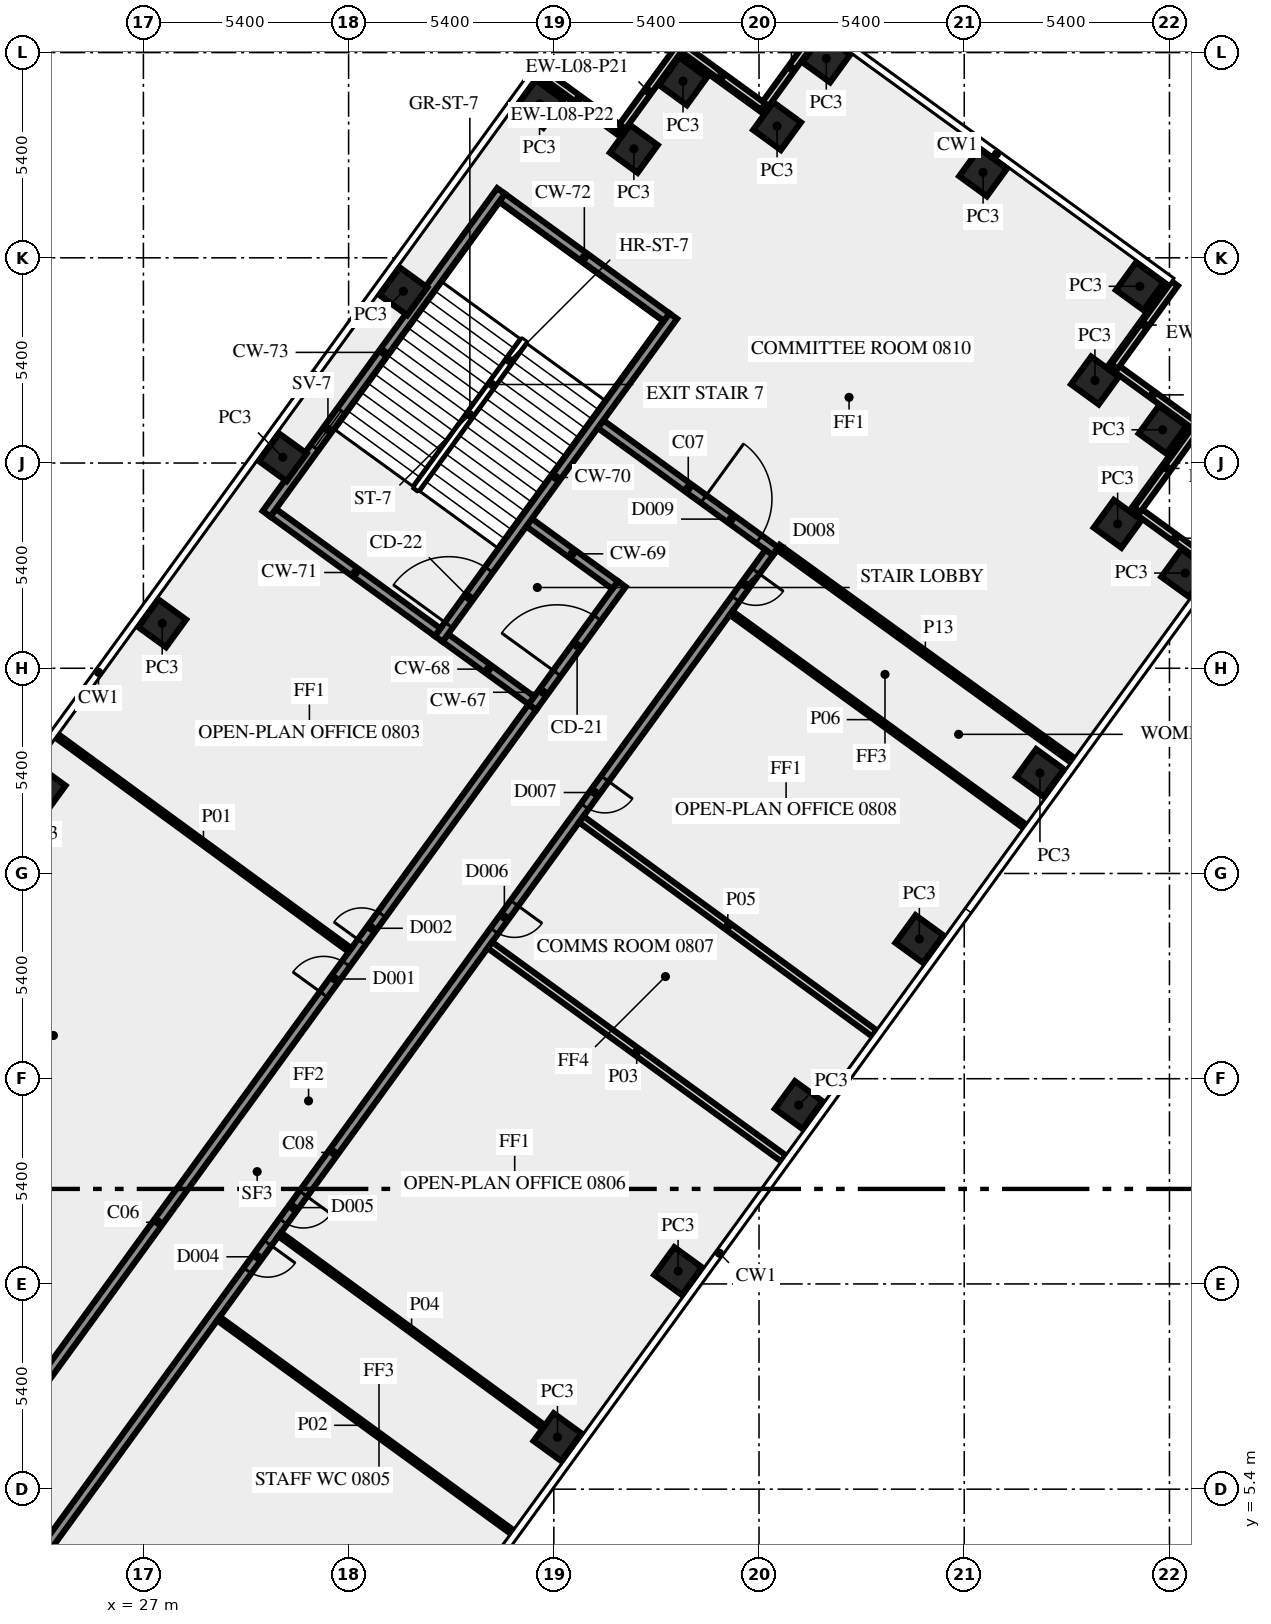
"""IFC4 building model, lengths in metres.
Left out: names, types, materials, properties, quantities, classifications, styles, units other than length and angle.
Written with IfcOpenShell. Run it as: python <this file> out.ifc"""

import sys

from ifc_helpers import new_model, si_unit, direction, frame, frame_2d, origin, origin_2d, place, context, subcontext, project, spatial, rectangle, extrude, element, fill, save


model = new_model("IFC4")
c1 = context("Model", 3, precision=1e-05, world=origin(), true_north=direction((0.0, 1.0)))
c2 = subcontext(c1, "Body", "Model", "MODEL_VIEW")
j1 = project(units=[si_unit("LENGTHUNIT", "METRE"), si_unit("PLANEANGLEUNIT", "RADIAN")], contexts=[c1])
p1 = place(None, origin())
s1 = spatial("IfcSite", under=j1, at=p1, CompositionType="ELEMENT")
p2 = place(p1, origin())
s2 = spatial("IfcBuilding", under=s1, at=p2, CompositionType="ELEMENT")
p3 = place(p2, frame((0.0, 0.0, 39.0)))
s3 = spatial("IfcBuildingStorey", under=s2, at=p3, CompositionType="ELEMENT", Elevation=39.0)
for number, where, z_axis, x_axis in (
    (1, (37.896, 6.769, 0.0), (0.0, 0.0, 1.0), (0.588, 0.809, 0.0)),
    (2, (41.07, 11.137, 0.0), (0.0, 0.0, 1.0), (0.588, 0.809, 0.0)),
    (3, (44.244, 15.506, 0.0), (0.0, 0.0, 1.0), (0.588, 0.809, 0.0)),
    (4, (47.418, 19.875, 0.0), (0.0, 0.0, 1.0), (0.588, 0.809, 0.0)),
    (5, (50.592, 24.243, 0.0), (0.0, 0.0, 1.0), (0.588, 0.809, 0.0)),
    (6, (54.415, 29.505, 0.0), (0.0, 0.0, 1.0), (0.588, 0.809, 0.0)),
    (7, (52.636, 30.8, 0.0), (0.0, 0.0, 1.0), (-0.809, 0.588, 0.0)),
    (8, (53.82, 33.275, 0.0), (0.0, 0.0, 1.0), (-0.809, 0.588, 0.0)),
    (9, (52.039, 34.571, 0.0), (0.0, 0.0, 1.0), (0.588, 0.809, 0.0)),
    (10, (53.22, 37.05, 0.0), (0.0, 0.0, 1.0), (-0.809, 0.588, 0.0)),
    (11, (49.096, 40.047, 0.0), (0.0, 0.0, 1.0), (-0.809, 0.588, 0.0)),
    (12, (44.97, 43.045, 0.0), (0.0, 0.0, 1.0), (-0.809, 0.588, 0.0)),
    (13, (43.675, 41.265, 0.0), (0.0, 0.0, 1.0), (-0.809, 0.588, 0.0)),
    (14, (41.2, 42.445, 0.0), (0.0, 0.0, 1.0), (-0.588, -0.809, 0.0)),
    (15, (39.906, 40.666, 0.0), (0.0, 0.0, 1.0), (-0.588, -0.809, 0.0)),
    (16, (37.425, 41.85, 0.0), (0.0, 0.0, 1.0), (-0.588, -0.809, 0.0)),
    (17, (33.843, 36.919, 0.0), (0.0, 0.0, 1.0), (-0.588, -0.809, 0.0)),
    (18, (30.669, 32.55, 0.0), (0.0, 0.0, 1.0), (-0.588, -0.809, 0.0)),
    (19, (27.495, 28.181, 0.0), (0.0, 0.0, 1.0), (-0.588, -0.809, 0.0)),
    (20, (24.321, 23.812, 0.0), (0.0, 0.0, 1.0), (-0.588, -0.809, 0.0)),
):
    element("IfcColumn", number, at=place(p3, frame(where, z_axis=z_axis, x_axis=x_axis)), inside=s3, PredefinedType="COLUMN", context=c2, shape_type="SweptSolid", body=[
        extrude(rectangle(XDim=0.9, YDim=0.9, at=origin_2d()), origin(), (0.0, 0.0, 1.0), 3.65),
    ])
p4 = place(p3, frame((55.247, 29.629, 0.0), z_axis=(0.0, 0.0, 1.0), x_axis=(-0.809033161865, 0.587762999008, 0.0)))
e21 = element("IfcWall", 21, at=p4, inside=s3, PredefinedType="SOLIDWALL", context=c2, shape_type="SweptSolid", body=[
    extrude(rectangle(XDim=2.7, YDim=0.2, at=frame_2d((1.35, 0.0))), origin(), (0.0, 0.0, 1.0), 3.65),
])
p5 = place(p3, frame((53.151, 31.167, 0.0), z_axis=(0.0, 0.0, 1.0), x_axis=(0.587779184282, 0.809021403008, 0.0)))
e22 = element("IfcWall", 22, at=p5, inside=s3, PredefinedType="SOLIDWALL", context=c2, shape_type="SweptSolid", body=[
    extrude(rectangle(XDim=2.7, YDim=0.2, at=frame_2d((1.35, 0.0))), origin(), (0.0, 0.0, 1.0), 3.65),
])
for number, where, z_axis, x_axis in (
    (23, (54.65, 33.4, 0.0), (0.0, 0.0, 1.0), (-0.809, 0.588, 0.0)),
    (24, (52.553, 34.938, 0.0), (0.0, 0.0, 1.0), (0.588, 0.809, 0.0)),
    (25, (44.846, 43.875, 0.0), (0.0, 0.0, 1.0), (-0.588, -0.809, 0.0)),
    (26, (43.308, 41.779, 0.0), (0.0, 0.0, 1.0), (-0.809, 0.588, 0.0)),
):
    element("IfcWall", number, at=place(p3, frame(where, z_axis=z_axis, x_axis=x_axis)), inside=s3, PredefinedType="SOLIDWALL", context=c2, shape_type="SweptSolid", body=[
        extrude(rectangle(XDim=2.7, YDim=0.2, at=frame_2d((1.35, 0.0))), origin(), (0.0, 0.0, 1.0), 3.65),
    ])
p6 = place(p3, frame((41.075, 43.278, 0.0), z_axis=(0.0, 0.0, 1.0), x_axis=(-0.587806000234, -0.809001919707, 0.0)))
e27 = element("IfcWall", 27, at=p6, inside=s3, PredefinedType="SOLIDWALL", context=c2, shape_type="SweptSolid", body=[
    extrude(rectangle(XDim=2.7, YDim=0.2, at=frame_2d((1.35, 0.0))), origin(), (0.0, 0.0, 1.0), 3.65),
])
p7 = place(p3, frame((39.537, 41.181, 0.0), z_axis=(0.0, 0.0, 1.0), x_axis=(-0.809033161865, 0.587762999008, 0.0)))
e28 = element("IfcWall", 28, at=p7, inside=s3, PredefinedType="SOLIDWALL", context=c2, shape_type="SweptSolid", body=[
    extrude(rectangle(XDim=2.7, YDim=0.2, at=frame_2d((1.35, 0.0))), origin(), (0.0, 0.0, 1.0), 3.65),
])
p8 = place(p3, frame((37.238, 25.98, 0.0), z_axis=(0.0, 0.0, 1.0), x_axis=(0.587772420479, 0.809026317077, 0.0)))
e29 = element("IfcWall", 29, at=p8, inside=s3, PredefinedType="SHEAR", context=c2, shape_type="SweptSolid", body=[
    extrude(rectangle(XDim=4.0, YDim=0.25, at=frame_2d((2.0, 0.0))), origin(), (0.0, 0.0, 1.0), 3.65),
])
p9 = place(p8, frame((1.1, 0.0, 0.0)))
e30 = element("IfcOpeningElement", 30, at=p9, cuts=e29, PredefinedType="OPENING", context=c2, shape_type="SweptSolid", body=[
    extrude(rectangle(XDim=1.8, YDim=2.1, at=frame_2d((0.9, 1.05))), frame((0.0, 0.135, 0.0), z_axis=(0.0, -1.0, 0.0), x_axis=(1.0, 0.0, 0.0)), (0.0, 0.0, 1.0), 0.27),
])
for number, where, z_axis, x_axis in (
    (31, (37.21, 26.154, 0.0), (0.0, 0.0, 1.0), (-0.809, 0.588, 0.0)),
    (32, (39.414, 29.188, 0.0), (0.0, 0.0, 1.0), (-0.809, 0.588, 0.0)),
):
    element("IfcWall", number, at=place(p3, frame(where, z_axis=z_axis, x_axis=x_axis)), inside=s3, PredefinedType="SHEAR", context=c2, shape_type="SweptSolid", body=[
        extrude(rectangle(XDim=2.8, YDim=0.25, at=frame_2d((1.4, 0.0))), origin(), (0.0, 0.0, 1.0), 3.65),
    ])
p10 = place(p3, frame((34.77, 27.772, 0.0), z_axis=(0.0, 0.0, 1.0), x_axis=(0.587795589702, 0.809009483706, 0.0)))
e33 = element("IfcWall", 33, at=p10, inside=s3, PredefinedType="SHEAR", context=c2, shape_type="SweptSolid", body=[
    extrude(rectangle(XDim=10.5, YDim=0.25, at=frame_2d((5.25, 0.0))), origin(), (0.0, 0.0, 1.0), 3.65),
])
p11 = place(p10, frame((0.45, 0.0, 0.0)))
e34 = element("IfcOpeningElement", 34, at=p11, cuts=e33, PredefinedType="OPENING", context=c2, shape_type="SweptSolid", body=[
    extrude(rectangle(XDim=1.8, YDim=2.1, at=frame_2d((0.9, 1.05))), frame((0.0, 0.135, 0.0), z_axis=(0.0, -1.0, 0.0), x_axis=(1.0, 0.0, 0.0)), (0.0, 0.0, 1.0), 0.27),
])
p12 = place(p3, frame((34.742, 27.947, 0.0), z_axis=(0.0, 0.0, 1.0), x_axis=(-0.8089984606, 0.587810760999, 0.0)))
e35 = element("IfcWall", 35, at=p12, inside=s3, PredefinedType="SHEAR", context=c2, shape_type="SweptSolid", body=[
    extrude(rectangle(XDim=5.35, YDim=0.25, at=frame_2d((2.675, 0.0))), origin(), (0.0, 0.0, 1.0), 3.65),
])
p13 = place(p3, frame((40.767, 36.24, 0.0), z_axis=(0.0, 0.0, 1.0), x_axis=(-0.809020161303, 0.587780893365, 0.0)))
e36 = element("IfcWall", 36, at=p13, inside=s3, PredefinedType="SHEAR", context=c2, shape_type="SweptSolid", body=[
    extrude(rectangle(XDim=5.35, YDim=0.25, at=frame_2d((2.675, 0.0))), origin(), (0.0, 0.0, 1.0), 3.65),
])
p14 = place(p3, frame((30.24, 31.064, 0.0), z_axis=(0.0, 0.0, 1.0), x_axis=(0.587795589702, 0.809009483706, 0.0)))
e37 = element("IfcWall", 37, at=p14, inside=s3, PredefinedType="SHEAR", context=c2, shape_type="SweptSolid", body=[
    extrude(rectangle(XDim=10.5, YDim=0.25, at=frame_2d((5.25, 0.0))), origin(), (0.0, 0.0, 1.0), 3.65),
])
p15 = place(p14, frame((2.15, 0.0, 1.0)))
e38 = element("IfcOpeningElement", 38, at=p15, cuts=e37, PredefinedType="OPENING", context=c2, shape_type="SweptSolid", body=[
    extrude(rectangle(XDim=1.2, YDim=1.2, at=frame_2d((0.6, 0.6))), frame((0.0, 0.135, 0.0), z_axis=(0.0, -1.0, 0.0), x_axis=(1.0, 0.0, 0.0)), (0.0, 0.0, 1.0), 0.27),
])
p16 = place(p3, frame((17.545, -1.125, 0.0), z_axis=(0.0, 0.0, 1.0), x_axis=(0.587786323093, 0.809016216391, 0.0)))
e39 = element("IfcWall", 39, at=p16, inside=s3, PredefinedType="SOLIDWALL", context=c2, shape_type="SweptSolid", body=[
    extrude(rectangle(XDim=33.493, YDim=0.25, at=frame_2d((16.747, 0.0))), origin(), (0.0, 0.0, 1.0), 3.65),
])
p17 = place(p16, frame((25.857, 0.0, 0.0)))
e40 = element("IfcOpeningElement", 40, at=p17, cuts=e39, PredefinedType="OPENING", context=c2, shape_type="SweptSolid", body=[
    extrude(rectangle(XDim=0.9, YDim=2.1, at=frame_2d((0.45, 1.05))), frame((0.0, 0.135, 0.0), z_axis=(0.0, -1.0, 0.0), x_axis=(1.0, 0.0, 0.0)), (0.0, 0.0, 1.0), 0.27),
])
p18 = place(p16, frame((24.157, 0.0, 0.0)))
e41 = element("IfcOpeningElement", 41, at=p18, cuts=e39, PredefinedType="OPENING", context=c2, shape_type="SweptSolid", body=[
    extrude(rectangle(XDim=1.0, YDim=2.1, at=frame_2d((0.5, 1.05))), frame((0.0, 0.135, 0.0), z_axis=(0.0, -1.0, 0.0), x_axis=(1.0, 0.0, 0.0)), (0.0, 0.0, 1.0), 0.27),
])
p19 = place(p3, frame((39.034, 33.42, 0.0), z_axis=(0.0, 0.0, 1.0), x_axis=(0.809023325802, -0.587776537732, 0.0)))
e42 = element("IfcWall", 42, at=p19, inside=s3, PredefinedType="SOLIDWALL", context=c2, shape_type="SweptSolid", body=[
    extrude(rectangle(XDim=5.695, YDim=0.25, at=frame_2d((2.848, 0.0))), origin(), (0.0, 0.0, 1.0), 3.65),
])
p20 = place(p19, frame((3.345, 0.0, 0.0)))
e43 = element("IfcOpeningElement", 43, at=p20, cuts=e42, PredefinedType="OPENING", context=c2, shape_type="SweptSolid", body=[
    extrude(rectangle(XDim=1.8, YDim=2.1, at=frame_2d((0.9, 1.05))), frame((0.0, 0.135, 0.0), z_axis=(0.0, -1.0, 0.0), x_axis=(1.0, 0.0, 0.0)), (0.0, 0.0, 1.0), 0.27),
])
p21 = place(p3, frame((43.467, 30.045, 0.0), z_axis=(0.0, 0.0, 1.0), x_axis=(-0.587784726077, -0.809017376692, 0.0)))
e44 = element("IfcWall", 44, at=p21, inside=s3, PredefinedType="SOLIDWALL", context=c2, shape_type="SweptSolid", body=[
    extrude(rectangle(XDim=39.02, YDim=0.25, at=frame_2d((19.51, 0.0))), origin(), (0.0, 0.0, 1.0), 3.65),
])
p22 = place(p21, frame((37.588, 0.0, 0.0)))
e45 = element("IfcOpeningElement", 45, at=p22, cuts=e44, PredefinedType="OPENING", context=c2, shape_type="SweptSolid", body=[
    extrude(rectangle(XDim=0.9, YDim=2.1, at=frame_2d((0.45, 1.05))), frame((0.0, 0.135, 0.0), z_axis=(0.0, -1.0, 0.0), x_axis=(1.0, 0.0, 0.0)), (0.0, 0.0, 1.0), 0.27),
])
p23 = place(p21, frame((20.855, 0.0, 0.0)))
e46 = element("IfcOpeningElement", 46, at=p23, cuts=e44, PredefinedType="OPENING", context=c2, shape_type="SweptSolid", body=[
    extrude(rectangle(XDim=0.9, YDim=2.1, at=frame_2d((0.45, 1.05))), frame((0.0, 0.135, 0.0), z_axis=(0.0, -1.0, 0.0), x_axis=(1.0, 0.0, 0.0)), (0.0, 0.0, 1.0), 0.27),
])
p24 = place(p21, frame((7.355, 0.0, 0.0)))
e47 = element("IfcOpeningElement", 47, at=p24, cuts=e44, PredefinedType="OPENING", context=c2, shape_type="SweptSolid", body=[
    extrude(rectangle(XDim=0.9, YDim=2.1, at=frame_2d((0.45, 1.05))), frame((0.0, 0.135, 0.0), z_axis=(0.0, -1.0, 0.0), x_axis=(1.0, 0.0, 0.0)), (0.0, 0.0, 1.0), 0.27),
])
p25 = place(p21, frame((11.404, 0.0, 0.0)))
e48 = element("IfcOpeningElement", 48, at=p25, cuts=e44, PredefinedType="OPENING", context=c2, shape_type="SweptSolid", body=[
    extrude(rectangle(XDim=0.9, YDim=2.1, at=frame_2d((0.45, 1.05))), frame((0.0, 0.135, 0.0), z_axis=(0.0, -1.0, 0.0), x_axis=(1.0, 0.0, 0.0)), (0.0, 0.0, 1.0), 0.27),
])
p26 = place(p21, frame((0.604, 0.0, 0.0)))
e49 = element("IfcOpeningElement", 49, at=p26, cuts=e44, PredefinedType="OPENING", context=c2, shape_type="SweptSolid", body=[
    extrude(rectangle(XDim=0.9, YDim=2.1, at=frame_2d((0.45, 1.05))), frame((0.0, 0.135, 0.0), z_axis=(0.0, -1.0, 0.0), x_axis=(1.0, 0.0, 0.0)), (0.0, 0.0, 1.0), 0.27),
])
p27 = place(p21, frame((22.455, 0.0, 0.0)))
e50 = element("IfcOpeningElement", 50, at=p27, cuts=e44, PredefinedType="OPENING", context=c2, shape_type="SweptSolid", body=[
    extrude(rectangle(XDim=0.9, YDim=2.1, at=frame_2d((0.45, 1.05))), frame((0.0, 0.135, 0.0), z_axis=(0.0, -1.0, 0.0), x_axis=(1.0, 0.0, 0.0)), (0.0, 0.0, 1.0), 0.27),
])
p28 = place(p3, frame((24.724, 25.217, 0.0), z_axis=(0.0, 0.0, 1.0), x_axis=(0.807606997933, -0.589721067023, 0.0)))
e51 = element("IfcWall", 51, at=p28, inside=s3, PredefinedType="PARTITIONING", context=c2, shape_type="SweptSolid", body=[
    extrude(rectangle(XDim=9.55, YDim=0.12, at=frame_2d((4.775, 0.0))), origin(), (0.0, 0.0, 1.0), 2.75),
])
p29 = place(p3, frame((36.702, 4.274, 0.0), z_axis=(0.0, 0.0, 1.0), x_axis=(-0.808998008689, 0.58781138296, 0.0)))
e52 = element("IfcWall", 52, at=p29, inside=s3, PredefinedType="PARTITIONING", context=c2, shape_type="SweptSolid", body=[
    extrude(rectangle(XDim=9.55, YDim=0.12, at=frame_2d((4.775, 0.0))), origin(), (0.0, 0.0, 1.0), 2.75),
])
p30 = place(p3, frame((43.844, 14.104, 0.0), z_axis=(0.0, 0.0, 1.0), x_axis=(-0.809102944047, 0.587666934526, 0.0)))
e53 = element("IfcWall", 53, at=p30, inside=s3, PredefinedType="SOLIDWALL", context=c2, shape_type="SweptSolid", body=[
    extrude(rectangle(XDim=9.55, YDim=0.2, at=frame_2d((4.775, 0.0))), origin(), (0.0, 0.0, 1.0), 2.75),
])
p31 = place(p3, frame((30.587, 12.104, 0.0), z_axis=(0.0, 0.0, 1.0), x_axis=(0.807590933527, -0.589743066161, 0.0)))
e54 = element("IfcWall", 54, at=p31, inside=s3, PredefinedType="PARTITIONING", context=c2, shape_type="SweptSolid", body=[
    extrude(rectangle(XDim=8.594, YDim=0.12, at=frame_2d((4.297, 0.0))), origin(), (0.0, 0.0, 1.0), 3.65),
])
p32 = place(p3, frame((38.522, 23.026, 0.0), z_axis=(0.0, 0.0, 1.0), x_axis=(0.807606997933, -0.589721067023, 0.0)))
e55 = element("IfcWall", 55, at=p32, inside=s3, PredefinedType="SOLIDWALL", context=c2, shape_type="SweptSolid", body=[
    extrude(rectangle(XDim=9.55, YDim=0.2, at=frame_2d((4.775, 0.0))), origin(), (0.0, 0.0, 1.0), 2.75),
])
p33 = place(p3, frame((50.192, 22.841, 0.0), z_axis=(0.0, 0.0, 1.0), x_axis=(-0.809033337127, 0.587762757767, 0.0)))
e56 = element("IfcWall", 56, at=p33, inside=s3, PredefinedType="PARTITIONING", context=c2, shape_type="SweptSolid", body=[
    extrude(rectangle(XDim=9.551, YDim=0.12, at=frame_2d((4.775, 0.0))), origin(), (0.0, 0.0, 1.0), 2.75),
])
p34 = place(p3, frame((43.698, 30.185, 0.0), z_axis=(0.0, 0.0, 1.0), x_axis=(0.810419489461, -0.58585002441, 0.0)))
e57 = element("IfcWall", 57, at=p34, inside=s3, PredefinedType="PARTITIONING", context=c2, shape_type="SweptSolid", body=[
    extrude(rectangle(XDim=9.57, YDim=0.15, at=frame_2d((4.785, 0.0))), origin(), (0.0, 0.0, 1.0), 2.75),
])
p35 = place(p9, origin())
e58 = element("IfcDoor", 58, at=p35, inside=s3, OperationType="DOUBLE_DOOR_SINGLE_SWING", PredefinedType="DOOR", context=c2, shape_type="SweptSolid", body=[
    extrude(rectangle(XDim=1.8, YDim=2.1, at=frame_2d((0.9, 1.05))), frame((0.0, 0.025, 0.0), z_axis=(0.0, -1.0, 0.0), x_axis=(1.0, 0.0, 0.0)), (0.0, 0.0, 1.0), 0.05),
])
fill(e30, e58)
p36 = place(p11, origin())
e59 = element("IfcDoor", 59, at=p36, inside=s3, OperationType="DOUBLE_DOOR_SINGLE_SWING", PredefinedType="DOOR", context=c2, shape_type="SweptSolid", body=[
    extrude(rectangle(XDim=1.8, YDim=2.1, at=frame_2d((0.9, 1.05))), frame((0.0, 0.025, 0.0), z_axis=(0.0, -1.0, 0.0), x_axis=(1.0, 0.0, 0.0)), (0.0, 0.0, 1.0), 0.05),
])
fill(e34, e59)
p37 = place(p15, origin())
e60 = element("IfcWindow", 60, at=p37, inside=s3, PartitioningType="SINGLE_PANEL", PredefinedType="WINDOW", context=c2, shape_type="SweptSolid", body=[
    extrude(rectangle(XDim=1.2, YDim=1.2, at=frame_2d((0.6, 0.6))), frame((0.0, 0.03, 0.0), z_axis=(0.0, -1.0, 0.0), x_axis=(1.0, 0.0, 0.0)), (0.0, 0.0, 1.0), 0.06),
])
fill(e38, e60)
p38 = place(p17, origin())
e61 = element("IfcDoor", 61, at=p38, inside=s3, OperationType="SINGLE_SWING_LEFT", PredefinedType="DOOR", context=c2, shape_type="SweptSolid", body=[
    extrude(rectangle(XDim=0.9, YDim=2.1, at=frame_2d((0.45, 1.05))), frame((0.0, 0.025, 0.0), z_axis=(0.0, -1.0, 0.0), x_axis=(1.0, 0.0, 0.0)), (0.0, 0.0, 1.0), 0.05),
])
fill(e40, e61)
p39 = place(p23, origin())
e62 = element("IfcDoor", 62, at=p39, inside=s3, OperationType="SINGLE_SWING_RIGHT", PredefinedType="DOOR", context=c2, shape_type="SweptSolid", body=[
    extrude(rectangle(XDim=0.9, YDim=2.1, at=frame_2d((0.45, 1.05))), frame((0.0, 0.025, 0.0), z_axis=(0.0, -1.0, 0.0), x_axis=(1.0, 0.0, 0.0)), (0.0, 0.0, 1.0), 0.05),
])
fill(e46, e62)
p40 = place(p24, origin())
e63 = element("IfcDoor", 63, at=p40, inside=s3, OperationType="SINGLE_SWING_RIGHT", PredefinedType="DOOR", context=c2, shape_type="SweptSolid", body=[
    extrude(rectangle(XDim=0.9, YDim=2.1, at=frame_2d((0.45, 1.05))), frame((0.0, 0.025, 0.0), z_axis=(0.0, -1.0, 0.0), x_axis=(1.0, 0.0, 0.0)), (0.0, 0.0, 1.0), 0.05),
])
fill(e47, e63)
p41 = place(p20, origin())
e64 = element("IfcDoor", 64, at=p41, inside=s3, OperationType="DOUBLE_DOOR_SINGLE_SWING", PredefinedType="DOOR", context=c2, shape_type="SweptSolid", body=[
    extrude(rectangle(XDim=1.8, YDim=2.1, at=frame_2d((0.9, 1.05))), frame((0.0, 0.025, 0.0), z_axis=(0.0, -1.0, 0.0), x_axis=(1.0, 0.0, 0.0)), (0.0, 0.0, 1.0), 0.05),
])
fill(e43, e64)
p42 = place(p25, origin())
e65 = element("IfcDoor", 65, at=p42, inside=s3, OperationType="SINGLE_SWING_RIGHT", PredefinedType="DOOR", context=c2, shape_type="SweptSolid", body=[
    extrude(rectangle(XDim=0.9, YDim=2.1, at=frame_2d((0.45, 1.05))), frame((0.0, 0.025, 0.0), z_axis=(0.0, -1.0, 0.0), x_axis=(1.0, 0.0, 0.0)), (0.0, 0.0, 1.0), 0.05),
])
fill(e48, e65)
p43 = place(p18, origin())
e66 = element("IfcDoor", 66, at=p43, inside=s3, OperationType="SINGLE_SWING_RIGHT", PredefinedType="DOOR", context=c2, shape_type="SweptSolid", body=[
    extrude(rectangle(XDim=1.0, YDim=2.1, at=frame_2d((0.5, 1.05))), frame((0.0, 0.025, 0.0), z_axis=(0.0, -1.0, 0.0), x_axis=(1.0, 0.0, 0.0)), (0.0, 0.0, 1.0), 0.05),
])
fill(e41, e66)
p44 = place(p26, origin())
e67 = element("IfcDoor", 67, at=p44, inside=s3, OperationType="SINGLE_SWING_RIGHT", PredefinedType="DOOR", context=c2, shape_type="SweptSolid", body=[
    extrude(rectangle(XDim=0.9, YDim=2.1, at=frame_2d((0.45, 1.05))), frame((0.0, 0.025, 0.0), z_axis=(0.0, -1.0, 0.0), x_axis=(1.0, 0.0, 0.0)), (0.0, 0.0, 1.0), 0.05),
])
fill(e49, e67)
p45 = place(p27, origin())
e68 = element("IfcDoor", 68, at=p45, inside=s3, OperationType="SINGLE_SWING_LEFT", PredefinedType="DOOR", context=c2, shape_type="SweptSolid", body=[
    extrude(rectangle(XDim=0.9, YDim=2.1, at=frame_2d((0.45, 1.05))), frame((0.0, 0.025, 0.0), z_axis=(0.0, -1.0, 0.0), x_axis=(1.0, 0.0, 0.0)), (0.0, 0.0, 1.0), 0.05),
])
fill(e50, e68)
save(model, sys.argv[1])
